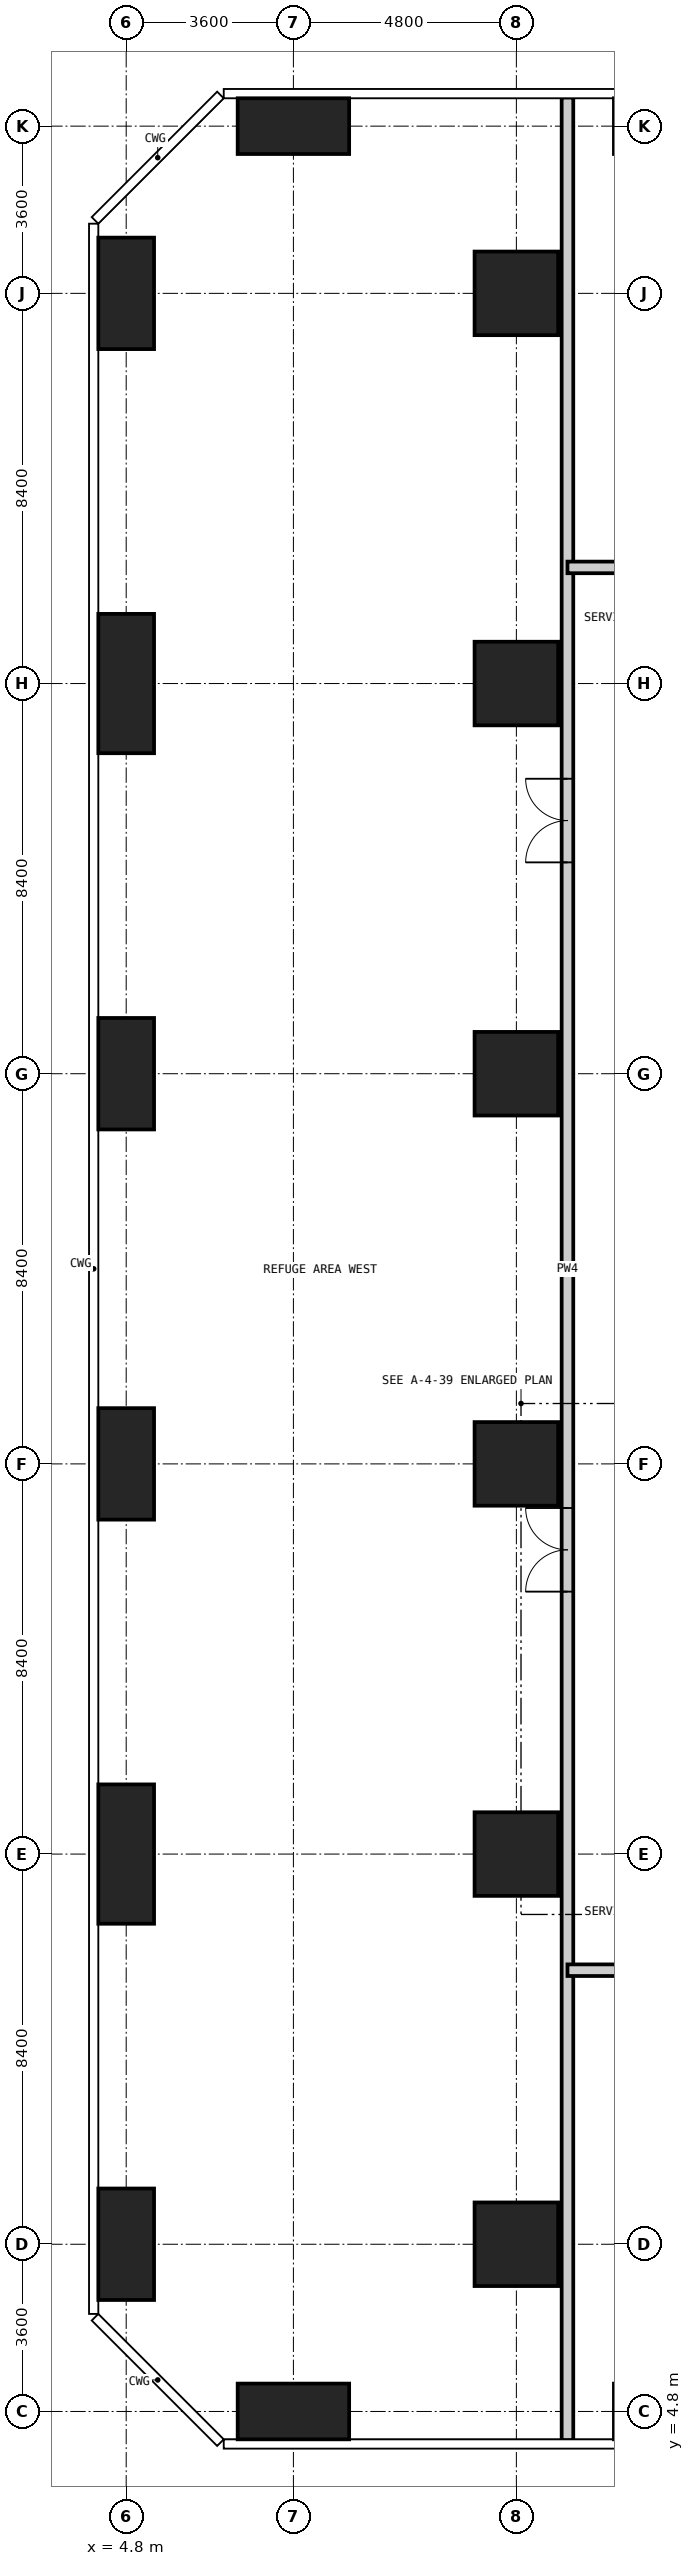
"""IFC4 building model, lengths in metres.
Left out: names, types, materials, properties, quantities, classifications, styles, units other than length and angle.
Written with IfcOpenShell. Run it as: python <this file> out.ifc"""

import sys

from ifc_helpers import new_model, si_unit, direction, frame, frame_2d, origin, origin_2d, place, context, subcontext, project, spatial, rectangle, extrude, element, fill, save


model = new_model("IFC4")
c1 = context("Model", 3, precision=1e-05, world=origin(), true_north=direction((0.0, 1.0)))
c2 = subcontext(c1, "Body", "Model", "MODEL_VIEW")
j1 = project(units=[si_unit("LENGTHUNIT", "METRE"), si_unit("PLANEANGLEUNIT", "RADIAN")], contexts=[c1])
p1 = place(None, origin())
s1 = spatial("IfcSite", under=j1, at=p1, CompositionType="ELEMENT")
p2 = place(p1, origin())
s2 = spatial("IfcBuilding", under=s1, at=p2, CompositionType="ELEMENT")
p3 = place(p2, frame((0.0, 0.0, 220.2)))
s3 = spatial("IfcBuildingStorey", under=s2, at=p3, CompositionType="ELEMENT", Elevation=220.2)
p4 = place(p3, frame((4.8, 8.4, -0.4), z_axis=(0.0, 0.0, 1.0), x_axis=(1.0, 0.0, 0.0)))
e1 = element("IfcColumn", 1, at=p4, inside=s3, PredefinedType="COLUMN", context=c2, shape_type="SweptSolid", body=[
    extrude(rectangle(XDim=1.2, YDim=2.4, at=origin_2d()), origin(), (0.0, 0.0, 1.0), 5.45),
])
p5 = place(p3, frame((4.8, 16.8, -0.4), z_axis=(0.0, 0.0, 1.0), x_axis=(1.0, 0.0, 0.0)))
e2 = element("IfcColumn", 2, at=p5, inside=s3, PredefinedType="COLUMN", context=c2, shape_type="SweptSolid", body=[
    extrude(rectangle(XDim=1.2, YDim=3.0, at=origin_2d()), origin(), (0.0, 0.0, 1.0), 5.45),
])
for number, where, z_axis, x_axis in (
    (3, (4.8, 25.2, -0.4), (0.0, 0.0, 1.0), (1.0, 0.0, 0.0)),
    (4, (4.8, 33.6, -0.4), (0.0, 0.0, 1.0), (1.0, 0.0, 0.0)),
):
    element("IfcColumn", number, at=place(p3, frame(where, z_axis=z_axis, x_axis=x_axis)), inside=s3, PredefinedType="COLUMN", context=c2, shape_type="SweptSolid", body=[
        extrude(rectangle(XDim=1.2, YDim=2.4, at=origin_2d()), origin(), (0.0, 0.0, 1.0), 5.45),
    ])
p6 = place(p3, frame((4.8, 42.0, -0.4), z_axis=(0.0, 0.0, 1.0), x_axis=(1.0, 0.0, 0.0)))
e5 = element("IfcColumn", 5, at=p6, inside=s3, PredefinedType="COLUMN", context=c2, shape_type="SweptSolid", body=[
    extrude(rectangle(XDim=1.2, YDim=3.0, at=origin_2d()), origin(), (0.0, 0.0, 1.0), 5.45),
])
p7 = place(p3, frame((4.8, 50.4, -0.4), z_axis=(0.0, 0.0, 1.0), x_axis=(1.0, 0.0, 0.0)))
e6 = element("IfcColumn", 6, at=p7, inside=s3, PredefinedType="COLUMN", context=c2, shape_type="SweptSolid", body=[
    extrude(rectangle(XDim=1.2, YDim=2.4, at=origin_2d()), origin(), (0.0, 0.0, 1.0), 5.45),
])
for number, where, z_axis, x_axis in (
    (7, (8.4, 4.8, -0.4), (0.0, 0.0, 1.0), (1.0, 0.0, 0.0)),
    (8, (8.4, 54.0, -0.4), (0.0, 0.0, 1.0), (1.0, 0.0, 0.0)),
):
    element("IfcColumn", number, at=place(p3, frame(where, z_axis=z_axis, x_axis=x_axis)), inside=s3, PredefinedType="COLUMN", context=c2, shape_type="SweptSolid", body=[
        extrude(rectangle(XDim=2.4, YDim=1.2, at=origin_2d()), origin(), (0.0, 0.0, 1.0), 5.45),
    ])
for number, where, z_axis, x_axis in (
    (9, (13.2, 8.4, -0.4), (0.0, 0.0, 1.0), (1.0, 0.0, 0.0)),
    (10, (13.2, 16.8, -0.4), (0.0, 0.0, 1.0), (1.0, 0.0, 0.0)),
    (11, (13.2, 25.2, -0.4), (0.0, 0.0, 1.0), (1.0, 0.0, 0.0)),
    (12, (13.2, 33.6, -0.4), (0.0, 0.0, 1.0), (1.0, 0.0, 0.0)),
    (13, (13.2, 42.0, -0.4), (0.0, 0.0, 1.0), (1.0, 0.0, 0.0)),
    (14, (13.2, 50.4, -0.4), (0.0, 0.0, 1.0), (1.0, 0.0, 0.0)),
):
    element("IfcColumn", number, at=place(p3, frame(where, z_axis=z_axis, x_axis=x_axis)), inside=s3, PredefinedType="COLUMN", context=c2, shape_type="SweptSolid", body=[
        extrude(rectangle(XDim=1.8, YDim=1.8, at=origin_2d()), origin(), (0.0, 0.0, 1.0), 5.45),
    ])
p8 = place(p3, frame((14.3, 4.182, 0.0), z_axis=(0.0, 0.0, 1.0), x_axis=(0.0, 1.0, 0.0)))
e15 = element("IfcWall", 15, at=p8, inside=s3, PredefinedType="PARTITIONING", context=c2, shape_type="SweptSolid", body=[
    extrude(rectangle(XDim=50.436, YDim=0.25, at=frame_2d((25.218, 0.0))), origin(), (0.0, 0.0, 1.0), 5.05),
])
p9 = place(p8, frame((18.268, 0.0, 0.0)))
e16 = element("IfcOpeningElement", 16, at=p9, cuts=e15, PredefinedType="OPENING", context=c2, shape_type="SweptSolid", body=[
    extrude(rectangle(XDim=1.8, YDim=2.4, at=frame_2d((0.9, 1.2))), frame((0.0, 0.135, 0.0), z_axis=(0.0, -1.0, 0.0), x_axis=(1.0, 0.0, 0.0)), (0.0, 0.0, 1.0), 0.27),
])
p10 = place(p8, frame((33.968, 0.0, 0.0)))
e17 = element("IfcOpeningElement", 17, at=p10, cuts=e15, PredefinedType="OPENING", context=c2, shape_type="SweptSolid", body=[
    extrude(rectangle(XDim=1.8, YDim=2.4, at=frame_2d((0.9, 1.2))), frame((0.0, 0.135, 0.0), z_axis=(0.0, -1.0, 0.0), x_axis=(1.0, 0.0, 0.0)), (0.0, 0.0, 1.0), 0.27),
])
p11 = place(p3, frame((14.3, 14.3, 0.0), z_axis=(0.0, 0.0, 1.0), x_axis=(1.0, 0.0, 0.0)))
e18 = element("IfcWall", 18, at=p11, inside=s3, PredefinedType="PARTITIONING", context=c2, shape_type="SweptSolid", body=[
    extrude(rectangle(XDim=30.2, YDim=0.25, at=frame_2d((15.1, 0.0))), origin(), (0.0, 0.0, 1.0), 5.05),
])
p12 = place(p11, frame((19.65, 0.0, 0.0)))
e19 = element("IfcOpeningElement", 19, at=p12, cuts=e18, PredefinedType="OPENING", context=c2, shape_type="SweptSolid", body=[
    extrude(rectangle(XDim=1.8, YDim=2.4, at=frame_2d((0.9, 1.2))), frame((0.0, 0.135, 0.0), z_axis=(0.0, -1.0, 0.0), x_axis=(1.0, 0.0, 0.0)), (0.0, 0.0, 1.0), 0.27),
])
p13 = place(p11, frame((4.55, 0.0, 0.0)))
e20 = element("IfcOpeningElement", 20, at=p13, cuts=e18, PredefinedType="OPENING", context=c2, shape_type="SweptSolid", body=[
    extrude(rectangle(XDim=1.8, YDim=2.4, at=frame_2d((0.9, 1.2))), frame((0.0, 0.135, 0.0), z_axis=(0.0, -1.0, 0.0), x_axis=(1.0, 0.0, 0.0)), (0.0, 0.0, 1.0), 0.27),
])
p14 = place(p3, frame((14.3, 44.5, 0.0), z_axis=(0.0, 0.0, 1.0), x_axis=(1.0, 0.0, 0.0)))
e21 = element("IfcWall", 21, at=p14, inside=s3, PredefinedType="PARTITIONING", context=c2, shape_type="SweptSolid", body=[
    extrude(rectangle(XDim=30.2, YDim=0.25, at=frame_2d((15.1, 0.0))), origin(), (0.0, 0.0, 1.0), 5.05),
])
p15 = place(p14, frame((4.55, 0.0, 0.0)))
e22 = element("IfcOpeningElement", 22, at=p15, cuts=e21, PredefinedType="OPENING", context=c2, shape_type="SweptSolid", body=[
    extrude(rectangle(XDim=1.8, YDim=2.4, at=frame_2d((0.9, 1.2))), frame((0.0, 0.135, 0.0), z_axis=(0.0, -1.0, 0.0), x_axis=(1.0, 0.0, 0.0)), (0.0, 0.0, 1.0), 0.27),
])
p16 = place(p14, frame((19.65, 0.0, 0.0)))
e23 = element("IfcOpeningElement", 23, at=p16, cuts=e21, PredefinedType="OPENING", context=c2, shape_type="SweptSolid", body=[
    extrude(rectangle(XDim=1.8, YDim=2.4, at=frame_2d((0.9, 1.2))), frame((0.0, 0.135, 0.0), z_axis=(0.0, -1.0, 0.0), x_axis=(1.0, 0.0, 0.0)), (0.0, 0.0, 1.0), 0.27),
])
p17 = place(p9, origin())
e24 = element("IfcDoor", 24, at=p17, inside=s3, OperationType="DOUBLE_DOOR_DOUBLE_SWING", PredefinedType="DOOR", context=c2, shape_type="SweptSolid", body=[
    extrude(rectangle(XDim=1.8, YDim=2.4, at=frame_2d((0.9, 1.2))), frame((0.0, 0.025, 0.0), z_axis=(0.0, -1.0, 0.0), x_axis=(1.0, 0.0, 0.0)), (0.0, 0.0, 1.0), 0.05),
])
fill(e16, e24)
p18 = place(p10, origin())
e25 = element("IfcDoor", 25, at=p18, inside=s3, OperationType="DOUBLE_DOOR_DOUBLE_SWING", PredefinedType="DOOR", context=c2, shape_type="SweptSolid", body=[
    extrude(rectangle(XDim=1.8, YDim=2.4, at=frame_2d((0.9, 1.2))), frame((0.0, 0.025, 0.0), z_axis=(0.0, -1.0, 0.0), x_axis=(1.0, 0.0, 0.0)), (0.0, 0.0, 1.0), 0.05),
])
fill(e17, e25)
save(model, sys.argv[1])
